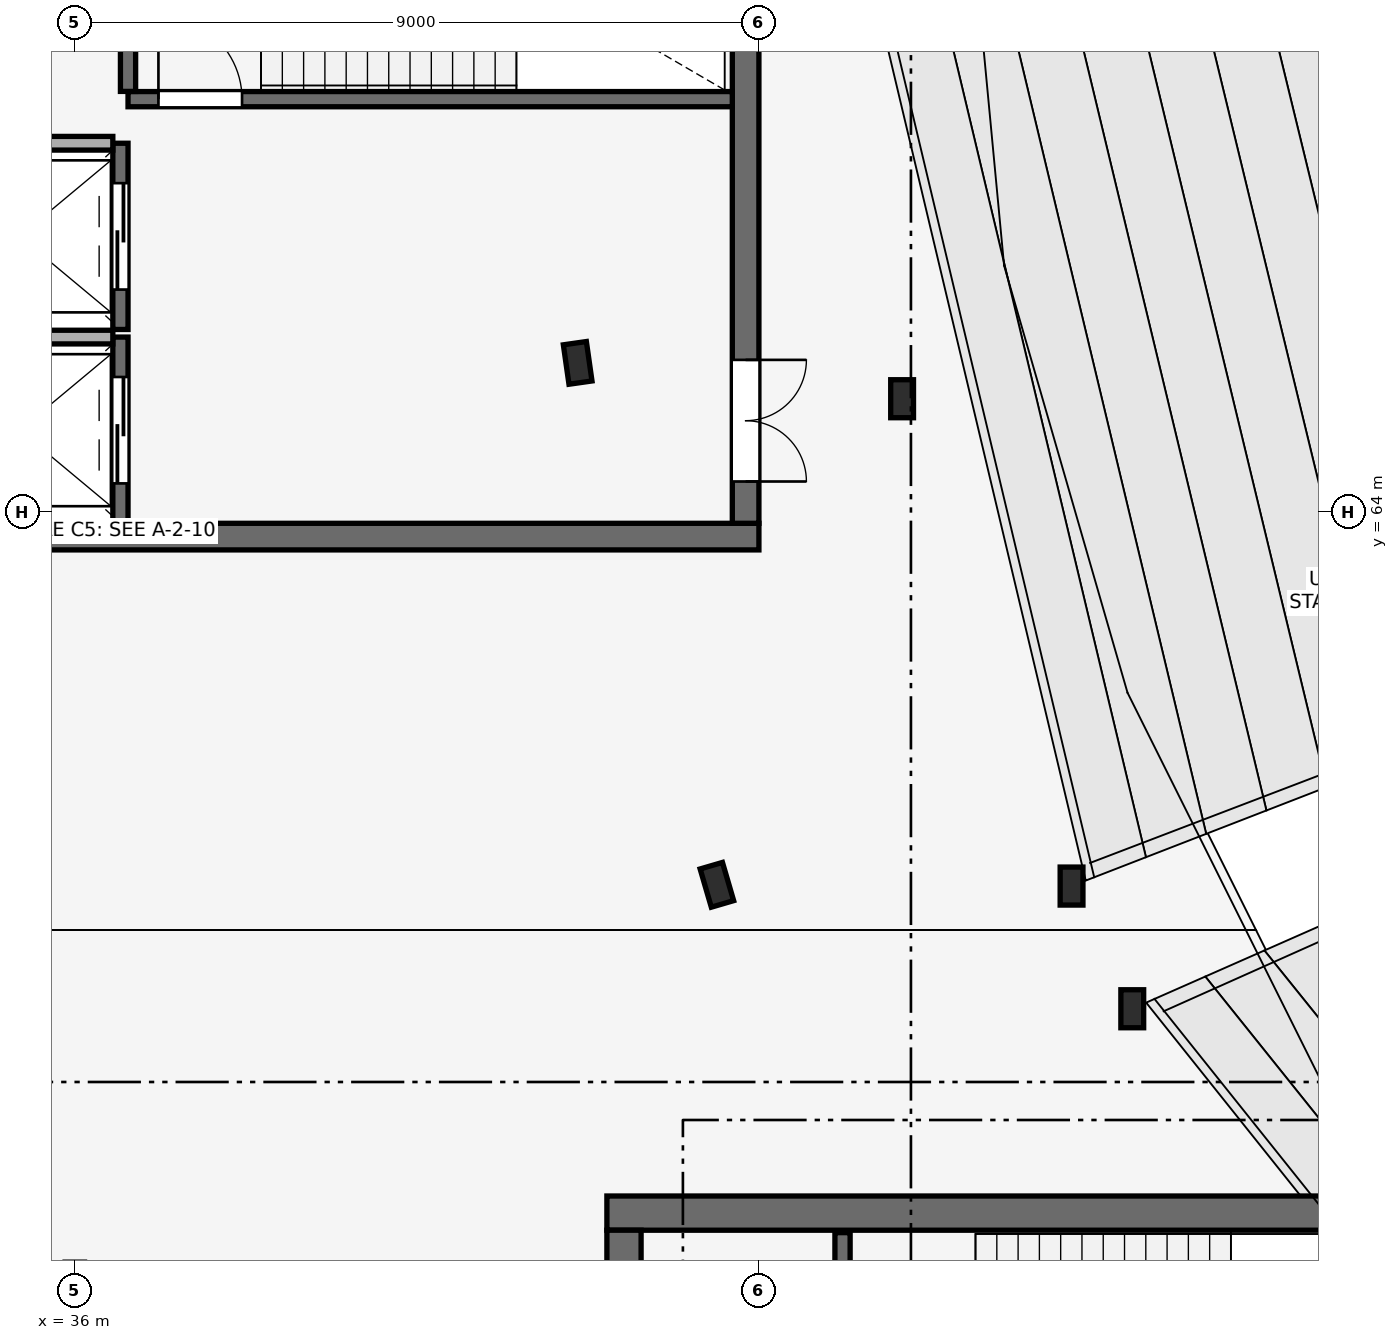
"""IFC4 building model, lengths in metres.
Left out: names, types, materials, properties, quantities, classifications, styles, units other than length and angle.
Written with IfcOpenShell. Run it as: python <this file> out.ifc"""

import sys

from ifc_helpers import new_model, si_unit, direction, frame, frame_2d, origin, origin_2d, place, context, subcontext, project, spatial, rectangle, i_section, extrude, element, fill, save


model = new_model("IFC4")
c1 = context("Model", 3, precision=1e-05, world=origin(), true_north=direction((0.0, 1.0)))
c2 = subcontext(c1, "Body", "Model", "MODEL_VIEW")
j1 = project(units=[si_unit("LENGTHUNIT", "METRE"), si_unit("PLANEANGLEUNIT", "RADIAN")], contexts=[c1])
p1 = place(None, origin())
s1 = spatial("IfcSite", under=j1, at=p1, CompositionType="ELEMENT")
p2 = place(p1, origin())
s2 = spatial("IfcBuilding", under=s1, at=p2, CompositionType="ELEMENT")
p3 = place(p2, frame((0.0, 0.0, 15.0)))
s3 = spatial("IfcBuildingStorey", under=s2, at=p3, CompositionType="ELEMENT", Elevation=15.0)
for number, where, z_axis, x_axis in (
    (1, (42.615, 65.96, 0.0), (0.0, 0.0, 1.0), (-0.99, -0.141, 0.0)),
    (2, (44.447, 59.094, 0.0), (0.0, 0.0, 1.0), (-0.96, -0.281, 0.0)),
):
    element("IfcColumn", number, at=place(p3, frame(where, z_axis=z_axis, x_axis=x_axis)), inside=s3, PredefinedType="COLUMN", context=c2, shape_type="SweptSolid", body=[
        extrude(i_section(OverallWidth=0.306, OverallDepth=0.524, WebThickness=0.021, FlangeThickness=0.04, FilletRadius=0.027, at=origin_2d()), origin(), (0.0, 0.0, 1.0), 4.5),
    ])
for number, where, z_axis, x_axis in (
    (3, (49.113, 59.077, 0.0), (0.0, 0.0, 1.0), (1.0, 0.0, 0.0)),
    (4, (49.912, 57.463, 0.0), (0.0, 0.0, 1.0), (1.0, 0.0, 0.0)),
):
    element("IfcColumn", number, at=place(p3, frame(where, z_axis=z_axis, x_axis=x_axis)), inside=s3, PredefinedType="COLUMN", context=c2, shape_type="SweptSolid", body=[
        extrude(i_section(OverallWidth=0.3, OverallDepth=0.5, WebThickness=0.014, FlangeThickness=0.028, FilletRadius=0.027, at=origin_2d()), origin(), (0.0, 0.0, 1.0), 4.5),
    ])
p4 = place(p3, frame((43.0, 54.775, 0.0), z_axis=(0.0, 0.0, 1.0), x_axis=(1.0, 0.0, 0.0)))
e5 = element("IfcWall", 5, at=p4, inside=s3, PredefinedType="SHEAR", context=c2, shape_type="SweptSolid", body=[
    extrude(rectangle(XDim=11.4, YDim=0.45, at=frame_2d((5.7, 0.0))), origin(), (0.0, 0.0, 1.0), 4.5),
])
p5 = place(p3, frame((43.225, 45.45, 0.0), z_axis=(0.0, 0.0, 1.0), x_axis=(0.0, 1.0, 0.0)))
e6 = element("IfcWall", 6, at=p5, inside=s3, PredefinedType="SHEAR", context=c2, shape_type="SweptSolid", body=[
    extrude(rectangle(XDim=9.1, YDim=0.45, at=frame_2d((4.55, 0.0))), origin(), (0.0, 0.0, 1.0), 4.5),
])
p6 = place(p3, frame((33.6, 63.675, 0.0), z_axis=(0.0, 0.0, 1.0), x_axis=(1.0, 0.0, 0.0)))
e7 = element("IfcWall", 7, at=p6, inside=s3, PredefinedType="SHEAR", context=c2, shape_type="SweptSolid", body=[
    extrude(rectangle(XDim=11.4, YDim=0.35, at=frame_2d((5.7, 0.0))), origin(), (0.0, 0.0, 1.0), 4.5),
])
p7 = place(p3, frame((44.825, 63.85, 0.0), z_axis=(0.0, 0.0, 1.0), x_axis=(0.0, 1.0, 0.0)))
e8 = element("IfcWall", 8, at=p7, inside=s3, PredefinedType="SHEAR", context=c2, shape_type="SweptSolid", body=[
    extrude(rectangle(XDim=9.3, YDim=0.35, at=frame_2d((4.65, 0.0))), origin(), (0.0, 0.0, 1.0), 4.5),
])
p8 = place(p7, frame((0.55, 0.0, 0.0)))
e9 = element("IfcOpeningElement", 9, at=p8, cuts=e8, PredefinedType="OPENING", context=c2, shape_type="SweptSolid", body=[
    extrude(rectangle(XDim=1.6, YDim=2.2, at=frame_2d((0.8, 1.1))), frame((0.0, 0.185, 0.0), z_axis=(0.0, -1.0, 0.0), x_axis=(1.0, 0.0, 0.0)), (0.0, 0.0, 1.0), 0.37),
])
p9 = place(p3, frame((46.884, 65.489, 0.0), z_axis=(0.0, 0.0, 1.0), x_axis=(1.0, 0.0, 0.0)))
e10 = element("IfcColumn", 10, at=p9, inside=s3, PredefinedType="COLUMN", context=c2, shape_type="SweptSolid", body=[
    extrude(i_section(OverallWidth=0.3, OverallDepth=0.5, WebThickness=0.014, FlangeThickness=0.028, FilletRadius=0.027, at=origin_2d()), origin(), (0.0, 0.0, 1.0), 4.5),
])
p10 = place(p3, frame((36.6, 63.85, 0.0), z_axis=(0.0, 0.0, 1.0), x_axis=(0.0, 1.0, 0.0)))
e11 = element("IfcWall", 11, at=p10, inside=s3, PredefinedType="SHEAR", context=c2, shape_type="SweptSolid", body=[
    extrude(rectangle(XDim=2.45, YDim=0.2, at=frame_2d((1.225, 0.0))), origin(), (0.0, 0.0, 1.0), 4.25),
])
p11 = place(p10, frame((0.525, 0.0, 0.0)))
e12 = element("IfcOpeningElement", 12, at=p11, cuts=e11, PredefinedType="OPENING", context=c2, shape_type="SweptSolid", body=[
    extrude(rectangle(XDim=1.4, YDim=2.2, at=frame_2d((0.7, 1.1))), frame((0.0, 0.11, 0.0), z_axis=(0.0, -1.0, 0.0), x_axis=(1.0, 0.0, 0.0)), (0.0, 0.0, 1.0), 0.22),
])
p12 = place(p3, frame((34.05, 66.3, 0.0), z_axis=(0.0, 0.0, 1.0), x_axis=(1.0, 0.0, 0.0)))
e13 = element("IfcWall", 13, at=p12, inside=s3, PredefinedType="PARTITIONING", context=c2, shape_type="SweptSolid", body=[
    extrude(rectangle(XDim=2.45, YDim=0.18, at=frame_2d((1.225, 0.0))), origin(), (0.0, 0.0, 1.0), 4.5),
])
p13 = place(p3, frame((36.6, 66.4, 0.0), z_axis=(0.0, 0.0, 1.0), x_axis=(0.0, 1.0, 0.0)))
e14 = element("IfcWall", 14, at=p13, inside=s3, PredefinedType="SHEAR", context=c2, shape_type="SweptSolid", body=[
    extrude(rectangle(XDim=2.45, YDim=0.2, at=frame_2d((1.225, 0.0))), origin(), (0.0, 0.0, 1.0), 4.25),
])
p14 = place(p13, frame((0.525, 0.0, 0.0)))
e15 = element("IfcOpeningElement", 15, at=p14, cuts=e14, PredefinedType="OPENING", context=c2, shape_type="SweptSolid", body=[
    extrude(rectangle(XDim=1.4, YDim=2.2, at=frame_2d((0.7, 1.1))), frame((0.0, 0.11, 0.0), z_axis=(0.0, -1.0, 0.0), x_axis=(1.0, 0.0, 0.0)), (0.0, 0.0, 1.0), 0.22),
])
p15 = place(p3, frame((34.05, 68.85, 0.0), z_axis=(0.0, 0.0, 1.0), x_axis=(1.0, 0.0, 0.0)))
e16 = element("IfcWall", 16, at=p15, inside=s3, PredefinedType="PARTITIONING", context=c2, shape_type="SweptSolid", body=[
    extrude(rectangle(XDim=2.45, YDim=0.18, at=frame_2d((1.225, 0.0))), origin(), (0.0, 0.0, 1.0), 4.5),
])
p16 = place(p3, frame((46.1, 50.832, 0.0), z_axis=(0.0, 0.0, 1.0), x_axis=(0.0, 1.0, 0.0)))
e17 = element("IfcWall", 17, at=p16, inside=s3, PredefinedType="SHEAR", context=c2, shape_type="SweptSolid", body=[
    extrude(rectangle(XDim=3.686, YDim=0.2, at=frame_2d((1.843, 0.0))), origin(), (0.0, 0.0, 1.0), 4.5),
])
p17 = place(p3, frame((36.7, 69.43, 0.0), z_axis=(0.0, 0.0, 1.0), x_axis=(1.0, 0.0, 0.0)))
e18 = element("IfcWall", 18, at=p17, inside=s3, PredefinedType="SHEAR", context=c2, shape_type="SweptSolid", body=[
    extrude(rectangle(XDim=7.95, YDim=0.2, at=frame_2d((3.975, 0.0))), origin(), (0.0, 0.0, 1.0), 4.5),
])
p18 = place(p17, frame((0.4, 0.0, 0.0)))
e19 = element("IfcOpeningElement", 19, at=p18, cuts=e18, PredefinedType="OPENING", context=c2, shape_type="SweptSolid", body=[
    extrude(rectangle(XDim=1.1, YDim=2.15, at=frame_2d((0.55, 1.075))), frame((0.0, 0.11, 0.0), z_axis=(0.0, -1.0, 0.0), x_axis=(1.0, 0.0, 0.0)), (0.0, 0.0, 1.0), 0.22),
])
p19 = place(p3, frame((36.7, 69.532, 0.0), z_axis=(0.0, 0.0, 1.0), x_axis=(0.0, 1.0, 0.0)))
e20 = element("IfcWall", 20, at=p19, inside=s3, PredefinedType="SHEAR", context=c2, shape_type="SweptSolid", body=[
    extrude(rectangle(XDim=3.586, YDim=0.2, at=frame_2d((1.793, 0.0))), origin(), (0.0, 0.0, 1.0), 4.5),
])
p20 = place(p11, origin())
e21 = element("IfcDoor", 21, at=p20, inside=s3, OperationType="DOUBLE_DOOR_SLIDING", PredefinedType="DOOR", context=c2, shape_type="SweptSolid", body=[
    extrude(rectangle(XDim=1.4, YDim=2.2, at=frame_2d((0.7, 1.1))), frame((0.0, 0.025, 0.0), z_axis=(0.0, -1.0, 0.0), x_axis=(1.0, 0.0, 0.0)), (0.0, 0.0, 1.0), 0.05),
])
fill(e12, e21)
p21 = place(p14, origin())
e22 = element("IfcDoor", 22, at=p21, inside=s3, OperationType="DOUBLE_DOOR_SLIDING", PredefinedType="DOOR", context=c2, shape_type="SweptSolid", body=[
    extrude(rectangle(XDim=1.4, YDim=2.2, at=frame_2d((0.7, 1.1))), frame((0.0, 0.025, 0.0), z_axis=(0.0, -1.0, 0.0), x_axis=(1.0, 0.0, 0.0)), (0.0, 0.0, 1.0), 0.05),
])
fill(e15, e22)
p22 = place(p18, frame((1.1, 0.0, 0.0), z_axis=(0.0, 0.0, 1.0), x_axis=(-1.0, 0.0, 0.0)))
e23 = element("IfcDoor", 23, at=p22, inside=s3, OperationType="SINGLE_SWING_RIGHT", PredefinedType="DOOR", context=c2, shape_type="SweptSolid", body=[
    extrude(rectangle(XDim=1.1, YDim=2.15, at=frame_2d((0.55, 1.075))), frame((0.0, 0.025, 0.0), z_axis=(0.0, -1.0, 0.0), x_axis=(1.0, 0.0, 0.0)), (0.0, 0.0, 1.0), 0.05),
])
fill(e19, e23)
p23 = place(p8, frame((1.6, 0.0, 0.0), z_axis=(0.0, 0.0, 1.0), x_axis=(-1.0, 0.0, 0.0)))
e24 = element("IfcDoor", 24, at=p23, inside=s3, OperationType="DOUBLE_DOOR_SINGLE_SWING", PredefinedType="DOOR", context=c2, shape_type="SweptSolid", body=[
    extrude(rectangle(XDim=1.6, YDim=2.2, at=frame_2d((0.8, 1.1))), frame((0.0, 0.025, 0.0), z_axis=(0.0, -1.0, 0.0), x_axis=(1.0, 0.0, 0.0)), (0.0, 0.0, 1.0), 0.05),
])
fill(e9, e24)
save(model, sys.argv[1])
